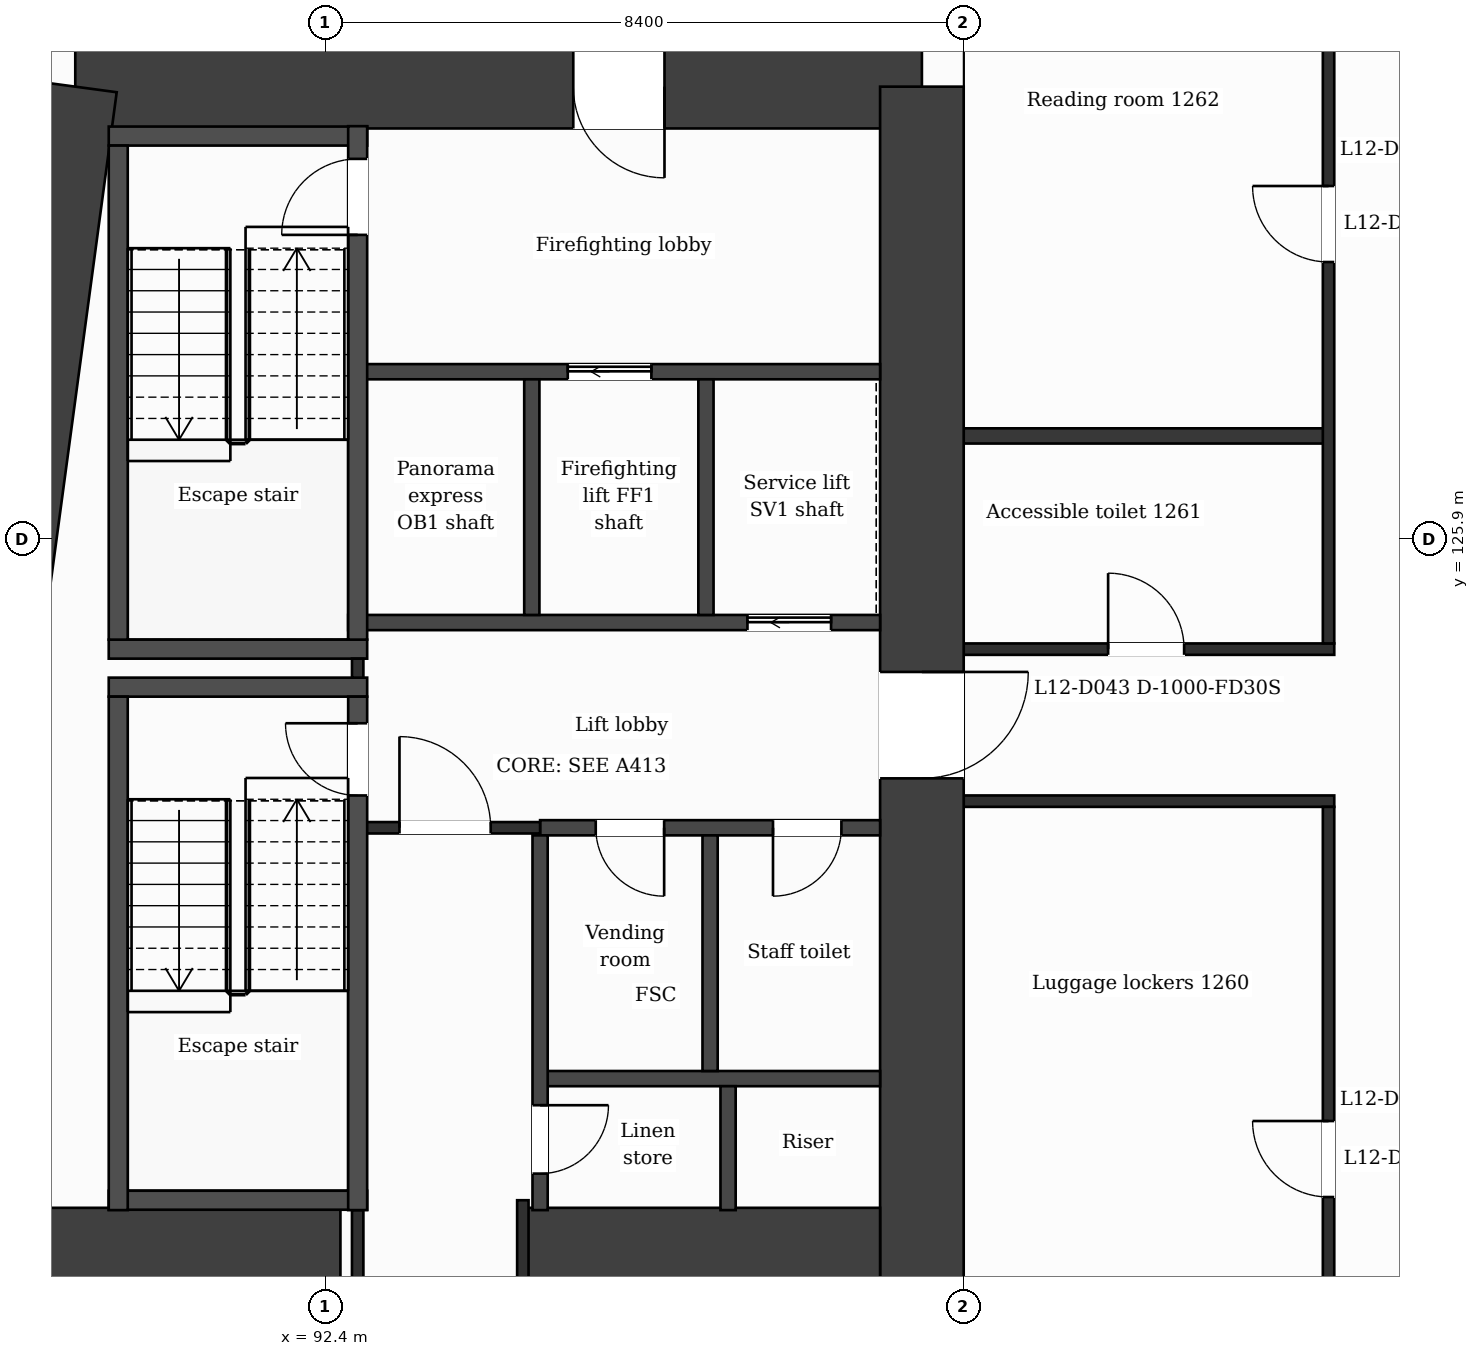
"""IFC4 building model, lengths in metres.
Left out: names, types, materials, properties, quantities, classifications, styles, units other than length and angle.
Written with IfcOpenShell. Run it as: python <this file> out.ifc"""

import sys

from ifc_helpers import new_model, si_unit, direction, frame, frame_2d, origin, place, context, subcontext, project, spatial, rectangle, extrude, element, fill, save


model = new_model("IFC4")
c1 = context("Model", 3, precision=1e-05, world=origin(), true_north=direction((0.0, 1.0)))
c2 = subcontext(c1, "Body", "Model", "MODEL_VIEW")
j1 = project(units=[si_unit("LENGTHUNIT", "METRE"), si_unit("PLANEANGLEUNIT", "RADIAN")], contexts=[c1])
p1 = place(None, origin())
s1 = spatial("IfcSite", under=j1, at=p1, CompositionType="ELEMENT")
p2 = place(p1, origin())
s2 = spatial("IfcBuilding", under=s1, at=p2, CompositionType="ELEMENT")
p3 = place(p2, frame((0.0, 0.0, 60.0)))
s3 = spatial("IfcBuildingStorey", under=s2, at=p3, CompositionType="ELEMENT", Elevation=60.0)
p4 = place(p3, frame((89.112, 131.85, 0.0), z_axis=(0.0, 0.0, 1.0), x_axis=(1.0, 0.0, 0.0)))
e1 = element("IfcWall", 1, at=p4, inside=s3, PredefinedType="SHEAR", context=c2, shape_type="SweptSolid", body=[
    extrude(rectangle(XDim=11.138, YDim=1.1, at=frame_2d((5.569, 0.0))), origin(), (0.0, 0.0, 1.0), 3.5),
])
p5 = place(p4, frame((6.552, 0.0, 0.0)))
e2 = element("IfcOpeningElement", 2, at=p5, cuts=e1, PredefinedType="OPENING", context=c2, shape_type="SweptSolid", body=[
    extrude(rectangle(XDim=1.2, YDim=2.1, at=frame_2d((0.6, 1.05))), frame((0.0, 0.56, 0.0), z_axis=(0.0, -1.0, 0.0), x_axis=(1.0, 0.0, 0.0)), (0.0, 0.0, 1.0), 1.12),
])
p6 = place(p3, frame((100.25, 131.85, 0.0), z_axis=(0.0, 0.0, 1.0), x_axis=(0.0, -1.0, 0.0)))
e3 = element("IfcWall", 3, at=p6, inside=s3, PredefinedType="SHEAR", context=c2, shape_type="SweptSolid", body=[
    extrude(rectangle(XDim=20.9, YDim=1.1, at=frame_2d((10.45, 0.0))), origin(), (0.0, 0.0, 1.0), 3.5),
])
p7 = place(p6, frame((7.7, 0.0, 0.0)))
e4 = element("IfcOpeningElement", 4, at=p7, cuts=e3, PredefinedType="OPENING", context=c2, shape_type="SweptSolid", body=[
    extrude(rectangle(XDim=1.4, YDim=2.1, at=frame_2d((0.7, 1.05))), frame((0.0, 0.56, 0.0), z_axis=(0.0, -1.0, 0.0), x_axis=(1.0, 0.0, 0.0)), (0.0, 0.0, 1.0), 1.12),
])
p8 = place(p3, frame((86.298, 110.95, 0.0), z_axis=(0.0, 0.0, 1.0), x_axis=(0.133400422634, 0.99106222168, 0.0)))
e5 = element("IfcWall", 5, at=p8, inside=s3, PredefinedType="SHEAR", context=c2, shape_type="SweptSolid", body=[
    extrude(rectangle(XDim=21.089, YDim=1.1, at=frame_2d((10.544, 0.0))), origin(), (0.0, 0.0, 1.0), 3.5),
])
p9 = place(p3, frame((87.523, 116.55, 0.0), z_axis=(0.0, 0.0, 1.0), x_axis=(1.0, 0.0, 0.0)))
e6 = element("IfcWall", 6, at=p9, inside=s3, PredefinedType="SHEAR", context=c2, shape_type="SweptSolid", body=[
    extrude(rectangle(XDim=5.077, YDim=1.1, at=frame_2d((2.539, 0.0))), origin(), (0.0, 0.0, 1.0), 3.5),
])
p10 = place(p3, frame((95.0, 116.55, 0.0), z_axis=(0.0, 0.0, 1.0), x_axis=(1.0, 0.0, 0.0)))
e7 = element("IfcWall", 7, at=p10, inside=s3, PredefinedType="SHEAR", context=c2, shape_type="SweptSolid", body=[
    extrude(rectangle(XDim=4.7, YDim=1.1, at=frame_2d((2.35, 0.0))), origin(), (0.0, 0.0, 1.0), 3.5),
])
p11 = place(p3, frame((89.552, 117.2, 0.0), z_axis=(0.0, 0.0, 1.0), x_axis=(1.0, 0.0, 0.0)))
e8 = element("IfcWall", 8, at=p11, inside=s3, PredefinedType="PARTITIONING", context=c2, shape_type="SweptSolid", body=[
    extrude(rectangle(XDim=3.4, YDim=0.25, at=frame_2d((1.7, 0.0))), origin(), (0.0, 0.0, 1.0), 3.18),
])
p12 = place(p3, frame((95.227, 118.8, 0.0), z_axis=(0.0, 0.0, 1.0), x_axis=(1.0, 0.0, 0.0)))
e9 = element("IfcWall", 9, at=p12, inside=s3, PredefinedType="PARTITIONING", context=c2, shape_type="SweptSolid", body=[
    extrude(rectangle(XDim=4.473, YDim=0.2, at=frame_2d((2.236, 0.0))), origin(), (0.0, 0.0, 1.0), 3.18),
])
p13 = place(p3, frame((95.227, 122.1, 0.0), z_axis=(0.0, 0.0, 1.0), x_axis=(1.0, 0.0, 0.0)))
e10 = element("IfcWall", 10, at=p13, inside=s3, PredefinedType="PARTITIONING", context=c2, shape_type="SweptSolid", body=[
    extrude(rectangle(XDim=4.473, YDim=0.2, at=frame_2d((2.236, 0.0))), origin(), (0.0, 0.0, 1.0), 3.18),
])
p14 = place(p13, frame((0.732, 0.0, 0.0)))
e11 = element("IfcOpeningElement", 11, at=p14, cuts=e10, PredefinedType="OPENING", context=c2, shape_type="SweptSolid", body=[
    extrude(rectangle(XDim=0.9, YDim=2.1, at=frame_2d((0.45, 1.05))), frame((0.0, 0.11, 0.0), z_axis=(0.0, -1.0, 0.0), x_axis=(1.0, 0.0, 0.0)), (0.0, 0.0, 1.0), 0.22),
])
p15 = place(p13, frame((3.064, 0.0, 0.0)))
e12 = element("IfcOpeningElement", 12, at=p15, cuts=e10, PredefinedType="OPENING", context=c2, shape_type="SweptSolid", body=[
    extrude(rectangle(XDim=0.9, YDim=2.1, at=frame_2d((0.45, 1.05))), frame((0.0, 0.11, 0.0), z_axis=(0.0, -1.0, 0.0), x_axis=(1.0, 0.0, 0.0)), (0.0, 0.0, 1.0), 0.22),
])
p16 = place(p3, frame((92.827, 122.1, 0.0), z_axis=(0.0, 0.0, 1.0), x_axis=(1.0, 0.0, 0.0)))
e13 = element("IfcWall", 13, at=p16, inside=s3, PredefinedType="PARTITIONING", context=c2, shape_type="SweptSolid", body=[
    extrude(rectangle(XDim=2.4, YDim=0.15, at=frame_2d((1.2, 0.0))), origin(), (0.0, 0.0, 1.0), 3.18),
])
p17 = place(p16, frame((0.55, 0.0, 0.0)))
e14 = element("IfcOpeningElement", 14, at=p17, cuts=e13, PredefinedType="OPENING", context=c2, shape_type="SweptSolid", body=[
    extrude(rectangle(XDim=1.2, YDim=2.1, at=frame_2d((0.6, 1.05))), frame((0.0, 0.085, 0.0), z_axis=(0.0, -1.0, 0.0), x_axis=(1.0, 0.0, 0.0)), (0.0, 0.0, 1.0), 0.17),
])
p18 = place(p3, frame((100.8, 122.45, 0.0), z_axis=(0.0, 0.0, 1.0), x_axis=(1.0, 0.0, 0.0)))
e15 = element("IfcWall", 15, at=p18, inside=s3, PredefinedType="PARTITIONING", context=c2, shape_type="SweptSolid", body=[
    extrude(rectangle(XDim=4.875, YDim=0.15, at=frame_2d((2.438, 0.0))), origin(), (0.0, 0.0, 1.0), 3.18),
])
for number, where, z_axis, x_axis in (
    (16, (89.552, 123.95, 0.0), (0.0, 0.0, 1.0), (1.0, 0.0, 0.0)),
    (17, (89.552, 124.45, 0.0), (0.0, 0.0, 1.0), (1.0, 0.0, 0.0)),
):
    element("IfcWall", number, at=place(p3, frame(where, z_axis=z_axis, x_axis=x_axis)), inside=s3, PredefinedType="PARTITIONING", context=c2, shape_type="SweptSolid", body=[
        extrude(rectangle(XDim=3.4, YDim=0.25, at=frame_2d((1.7, 0.0))), origin(), (0.0, 0.0, 1.0), 3.18),
    ])
p19 = place(p3, frame((100.8, 124.45, 0.0), z_axis=(0.0, 0.0, 1.0), x_axis=(1.0, 0.0, 0.0)))
e18 = element("IfcWall", 18, at=p19, inside=s3, PredefinedType="PARTITIONING", context=c2, shape_type="SweptSolid", body=[
    extrude(rectangle(XDim=4.875, YDim=0.15, at=frame_2d((2.438, 0.0))), origin(), (0.0, 0.0, 1.0), 3.18),
])
p20 = place(p19, frame((1.9, 0.0, 0.0)))
e19 = element("IfcOpeningElement", 19, at=p20, cuts=e18, PredefinedType="OPENING", context=c2, shape_type="SweptSolid", body=[
    extrude(rectangle(XDim=1.0, YDim=2.1, at=frame_2d((0.5, 1.05))), frame((0.0, 0.085, 0.0), z_axis=(0.0, -1.0, 0.0), x_axis=(1.0, 0.0, 0.0)), (0.0, 0.0, 1.0), 0.17),
])
p21 = place(p3, frame((92.702, 124.8, 0.0), z_axis=(0.0, 0.0, 1.0), x_axis=(1.0, 0.0, 0.0)))
e20 = element("IfcWall", 20, at=p21, inside=s3, PredefinedType="PARTITIONING", context=c2, shape_type="SweptSolid", body=[
    extrude(rectangle(XDim=6.998, YDim=0.2, at=frame_2d((3.499, 0.0))), origin(), (0.0, 0.0, 1.0), 3.18),
])
p22 = place(p21, frame((5.253, 0.0, 0.0)))
e21 = element("IfcOpeningElement", 21, at=p22, cuts=e20, PredefinedType="OPENING", context=c2, shape_type="SweptSolid", body=[
    extrude(rectangle(XDim=1.1, YDim=2.1, at=frame_2d((0.55, 1.05))), frame((0.0, 0.11, 0.0), z_axis=(0.0, -1.0, 0.0), x_axis=(1.0, 0.0, 0.0)), (0.0, 0.0, 1.0), 0.22),
])
p23 = place(p3, frame((100.8, 127.255, 0.0), z_axis=(0.0, 0.0, 1.0), x_axis=(1.0, 0.0, 0.0)))
e22 = element("IfcWall", 22, at=p23, inside=s3, PredefinedType="PARTITIONING", context=c2, shape_type="SweptSolid", body=[
    extrude(rectangle(XDim=4.8, YDim=0.2, at=frame_2d((2.4, 0.0))), origin(), (0.0, 0.0, 1.0), 3.18),
])
p24 = place(p3, frame((92.827, 128.1, 0.0), z_axis=(0.0, 0.0, 1.0), x_axis=(1.0, 0.0, 0.0)))
e23 = element("IfcWall", 23, at=p24, inside=s3, PredefinedType="PARTITIONING", context=c2, shape_type="SweptSolid", body=[
    extrude(rectangle(XDim=6.873, YDim=0.2, at=frame_2d((3.437, 0.0))), origin(), (0.0, 0.0, 1.0), 3.18),
])
p25 = place(p24, frame((2.764, 0.0, 0.0)))
e24 = element("IfcOpeningElement", 24, at=p25, cuts=e23, PredefinedType="OPENING", context=c2, shape_type="SweptSolid", body=[
    extrude(rectangle(XDim=1.1, YDim=2.1, at=frame_2d((0.55, 1.05))), frame((0.0, 0.11, 0.0), z_axis=(0.0, -1.0, 0.0), x_axis=(1.0, 0.0, 0.0)), (0.0, 0.0, 1.0), 0.22),
])
p26 = place(p3, frame((89.552, 131.2, 0.0), z_axis=(0.0, 0.0, 1.0), x_axis=(1.0, 0.0, 0.0)))
e25 = element("IfcWall", 25, at=p26, inside=s3, PredefinedType="PARTITIONING", context=c2, shape_type="SweptSolid", body=[
    extrude(rectangle(XDim=3.4, YDim=0.25, at=frame_2d((1.7, 0.0))), origin(), (0.0, 0.0, 1.0), 3.18),
])
p27 = place(p3, frame((89.677, 117.07, 0.0), z_axis=(0.0, 0.0, 1.0), x_axis=(0.0, 1.0, 0.0)))
e26 = element("IfcWall", 26, at=p27, inside=s3, PredefinedType="PARTITIONING", context=c2, shape_type="SweptSolid", body=[
    extrude(rectangle(XDim=6.755, YDim=0.25, at=frame_2d((3.377, 0.0))), origin(), (0.0, 0.0, 1.0), 3.18),
])
p28 = place(p3, frame((89.677, 124.575, 0.0), z_axis=(0.0, 0.0, 1.0), x_axis=(0.0, 1.0, 0.0)))
e27 = element("IfcWall", 27, at=p28, inside=s3, PredefinedType="PARTITIONING", context=c2, shape_type="SweptSolid", body=[
    extrude(rectangle(XDim=6.5, YDim=0.25, at=frame_2d((3.25, 0.0))), origin(), (0.0, 0.0, 1.0), 3.18),
])
p29 = place(p3, frame((92.827, 116.0, 0.0), z_axis=(0.0, 0.0, 1.0), x_axis=(0.0, 1.0, 0.0)))
e28 = element("IfcWall", 28, at=p29, inside=s3, PredefinedType="PARTITIONING", context=c2, shape_type="SweptSolid", body=[
    extrude(rectangle(XDim=1.07, YDim=0.15, at=frame_2d((0.535, 0.0))), origin(), (0.0, 0.0, 1.0), 3.18),
])
p30 = place(p3, frame((92.827, 124.075, 0.0), z_axis=(0.0, 0.0, 1.0), x_axis=(0.0, 1.0, 0.0)))
e29 = element("IfcWall", 29, at=p30, inside=s3, PredefinedType="PARTITIONING", context=c2, shape_type="SweptSolid", body=[
    extrude(rectangle(XDim=0.25, YDim=0.15, at=frame_2d((0.125, 0.0))), origin(), (0.0, 0.0, 1.0), 3.18),
])
p31 = place(p3, frame((92.827, 117.07, 0.0), z_axis=(0.0, 0.0, 1.0), x_axis=(0.0, 1.0, 0.0)))
e30 = element("IfcWall", 30, at=p31, inside=s3, PredefinedType="PARTITIONING", context=c2, shape_type="SweptSolid", body=[
    extrude(rectangle(XDim=6.755, YDim=0.25, at=frame_2d((3.377, 0.0))), origin(), (0.0, 0.0, 1.0), 3.18),
])
p32 = place(p31, frame((5.455, 0.0, 0.0)))
e31 = element("IfcOpeningElement", 31, at=p32, cuts=e30, PredefinedType="OPENING", context=c2, shape_type="SweptSolid", body=[
    extrude(rectangle(XDim=0.95, YDim=2.1, at=frame_2d((0.475, 1.05))), frame((0.0, 0.135, 0.0), z_axis=(0.0, -1.0, 0.0), x_axis=(1.0, 0.0, 0.0)), (0.0, 0.0, 1.0), 0.27),
])
p33 = place(p3, frame((92.827, 124.575, 0.0), z_axis=(0.0, 0.0, 1.0), x_axis=(0.0, 1.0, 0.0)))
e32 = element("IfcWall", 32, at=p33, inside=s3, PredefinedType="PARTITIONING", context=c2, shape_type="SweptSolid", body=[
    extrude(rectangle(XDim=6.755, YDim=0.25, at=frame_2d((3.377, 0.0))), origin(), (0.0, 0.0, 1.0), 3.18),
])
p34 = place(p33, frame((5.325, 0.0, 0.0)))
e33 = element("IfcOpeningElement", 33, at=p34, cuts=e32, PredefinedType="OPENING", context=c2, shape_type="SweptSolid", body=[
    extrude(rectangle(XDim=1.0, YDim=2.1, at=frame_2d((0.5, 1.05))), frame((0.0, 0.135, 0.0), z_axis=(0.0, -1.0, 0.0), x_axis=(1.0, 0.0, 0.0)), (0.0, 0.0, 1.0), 0.27),
])
p35 = place(p3, frame((95.0, 116.0, 0.0), z_axis=(0.0, 0.0, 1.0), x_axis=(0.0, 1.0, 0.0)))
e34 = element("IfcWall", 34, at=p35, inside=s3, PredefinedType="PARTITIONING", context=c2, shape_type="SweptSolid", body=[
    extrude(rectangle(XDim=1.2, YDim=0.15, at=frame_2d((0.6, 0.0))), origin(), (0.0, 0.0, 1.0), 3.18),
])
p36 = place(p3, frame((95.118, 124.9, 0.0), z_axis=(0.0, 0.0, 1.0), x_axis=(0.0, 1.0, 0.0)))
e35 = element("IfcWall", 35, at=p36, inside=s3, PredefinedType="PARTITIONING", context=c2, shape_type="SweptSolid", body=[
    extrude(rectangle(XDim=3.1, YDim=0.2, at=frame_2d((1.55, 0.0))), origin(), (0.0, 0.0, 1.0), 3.18),
])
p37 = place(p3, frame((95.227, 117.07, 0.0), z_axis=(0.0, 0.0, 1.0), x_axis=(0.0, 1.0, 0.0)))
e36 = element("IfcWall", 36, at=p37, inside=s3, PredefinedType="PARTITIONING", context=c2, shape_type="SweptSolid", body=[
    extrude(rectangle(XDim=4.93, YDim=0.2, at=frame_2d((2.465, 0.0))), origin(), (0.0, 0.0, 1.0), 3.18),
])
p38 = place(p37, frame((0.48, 0.0, 0.0)))
e37 = element("IfcOpeningElement", 37, at=p38, cuts=e36, PredefinedType="OPENING", context=c2, shape_type="SweptSolid", body=[
    extrude(rectangle(XDim=0.9, YDim=2.1, at=frame_2d((0.45, 1.05))), frame((0.0, 0.11, 0.0), z_axis=(0.0, -1.0, 0.0), x_axis=(1.0, 0.0, 0.0)), (0.0, 0.0, 1.0), 0.22),
])
for number, where, z_axis, x_axis in (
    (38, (97.409, 124.9, 0.0), (0.0, 0.0, 1.0), (0.0, 1.0, 0.0)),
    (39, (97.463, 118.9, 0.0), (0.0, 0.0, 1.0), (0.0, 1.0, 0.0)),
):
    element("IfcWall", number, at=place(p3, frame(where, z_axis=z_axis, x_axis=x_axis)), inside=s3, PredefinedType="PARTITIONING", context=c2, shape_type="SweptSolid", body=[
        extrude(rectangle(XDim=3.1, YDim=0.2, at=frame_2d((1.55, 0.0))), origin(), (0.0, 0.0, 1.0), 3.18),
    ])
p39 = place(p3, frame((97.7, 117.07, 0.0), z_axis=(0.0, 0.0, 1.0), x_axis=(0.0, 1.0, 0.0)))
e40 = element("IfcWall", 40, at=p39, inside=s3, PredefinedType="PARTITIONING", context=c2, shape_type="SweptSolid", body=[
    extrude(rectangle(XDim=1.63, YDim=0.2, at=frame_2d((0.815, 0.0))), origin(), (0.0, 0.0, 1.0), 3.18),
])
p40 = place(p3, frame((105.6, 109.075, 0.0), z_axis=(0.0, 0.0, 1.0), x_axis=(0.0, 1.0, 0.0)))
e41 = element("IfcWall", 41, at=p40, inside=s3, PredefinedType="PARTITIONING", context=c2, shape_type="SweptSolid", body=[
    extrude(rectangle(XDim=13.3, YDim=0.15, at=frame_2d((6.65, 0.0))), origin(), (0.0, 0.0, 1.0), 3.18),
])
p41 = place(p40, frame((8.167, 0.0, 0.0)))
e42 = element("IfcOpeningElement", 42, at=p41, cuts=e41, PredefinedType="OPENING", context=c2, shape_type="SweptSolid", body=[
    extrude(rectangle(XDim=1.0, YDim=2.1, at=frame_2d((0.5, 1.05))), frame((0.0, 0.085, 0.0), z_axis=(0.0, -1.0, 0.0), x_axis=(1.0, 0.0, 0.0)), (0.0, 0.0, 1.0), 0.17),
])
p42 = place(p3, frame((105.6, 124.525, 0.0), z_axis=(0.0, 0.0, 1.0), x_axis=(0.0, 1.0, 0.0)))
e43 = element("IfcWall", 43, at=p42, inside=s3, PredefinedType="PARTITIONING", context=c2, shape_type="SweptSolid", body=[
    extrude(rectangle(XDim=9.2, YDim=0.15, at=frame_2d((4.6, 0.0))), origin(), (0.0, 0.0, 1.0), 3.18),
])
p43 = place(p42, frame((5.018, 0.0, 0.0)))
e44 = element("IfcOpeningElement", 44, at=p43, cuts=e43, PredefinedType="OPENING", context=c2, shape_type="SweptSolid", body=[
    extrude(rectangle(XDim=1.0, YDim=2.1, at=frame_2d((0.5, 1.05))), frame((0.0, 0.085, 0.0), z_axis=(0.0, -1.0, 0.0), x_axis=(1.0, 0.0, 0.0)), (0.0, 0.0, 1.0), 0.17),
])
p44 = place(p17, origin())
e45 = element("IfcDoor", 45, at=p44, inside=s3, OperationType="SINGLE_SWING_LEFT", PredefinedType="DOOR", context=c2, shape_type="SweptSolid", body=[
    extrude(rectangle(XDim=1.2, YDim=2.1, at=frame_2d((0.6, 1.05))), frame((0.0, 0.025, 0.0), z_axis=(0.0, -1.0, 0.0), x_axis=(1.0, 0.0, 0.0)), (0.0, 0.0, 1.0), 0.05),
])
fill(e14, e45)
p45 = place(p25, origin())
e46 = element("IfcDoor", 46, at=p45, inside=s3, OperationType="SLIDING_TO_LEFT", PredefinedType="DOOR", context=c2, shape_type="SweptSolid", body=[
    extrude(rectangle(XDim=1.1, YDim=2.1, at=frame_2d((0.55, 1.05))), frame((0.0, 0.025, 0.0), z_axis=(0.0, -1.0, 0.0), x_axis=(1.0, 0.0, 0.0)), (0.0, 0.0, 1.0), 0.05),
])
fill(e24, e46)
p46 = place(p22, origin())
e47 = element("IfcDoor", 47, at=p46, inside=s3, OperationType="SLIDING_TO_LEFT", PredefinedType="DOOR", context=c2, shape_type="SweptSolid", body=[
    extrude(rectangle(XDim=1.1, YDim=2.1, at=frame_2d((0.55, 1.05))), frame((0.0, 0.025, 0.0), z_axis=(0.0, -1.0, 0.0), x_axis=(1.0, 0.0, 0.0)), (0.0, 0.0, 1.0), 0.05),
])
fill(e21, e47)
p47 = place(p14, origin())
e48 = element("IfcDoor", 48, at=p47, inside=s3, OperationType="SINGLE_SWING_RIGHT", PredefinedType="DOOR", context=c2, shape_type="SweptSolid", body=[
    extrude(rectangle(XDim=0.9, YDim=2.1, at=frame_2d((0.45, 1.05))), frame((0.0, 0.025, 0.0), z_axis=(0.0, -1.0, 0.0), x_axis=(1.0, 0.0, 0.0)), (0.0, 0.0, 1.0), 0.05),
])
fill(e11, e48)
p48 = place(p15, origin())
e49 = element("IfcDoor", 49, at=p48, inside=s3, OperationType="SINGLE_SWING_LEFT", PredefinedType="DOOR", context=c2, shape_type="SweptSolid", body=[
    extrude(rectangle(XDim=0.9, YDim=2.1, at=frame_2d((0.45, 1.05))), frame((0.0, 0.025, 0.0), z_axis=(0.0, -1.0, 0.0), x_axis=(1.0, 0.0, 0.0)), (0.0, 0.0, 1.0), 0.05),
])
fill(e12, e49)
p49 = place(p32, origin())
e50 = element("IfcDoor", 50, at=p49, inside=s3, OperationType="SINGLE_SWING_RIGHT", PredefinedType="DOOR", context=c2, shape_type="SweptSolid", body=[
    extrude(rectangle(XDim=0.95, YDim=2.1, at=frame_2d((0.475, 1.05))), frame((0.0, 0.025, 0.0), z_axis=(0.0, -1.0, 0.0), x_axis=(1.0, 0.0, 0.0)), (0.0, 0.0, 1.0), 0.05),
])
fill(e31, e50)
p50 = place(p34, origin())
e51 = element("IfcDoor", 51, at=p50, inside=s3, OperationType="SINGLE_SWING_LEFT", PredefinedType="DOOR", context=c2, shape_type="SweptSolid", body=[
    extrude(rectangle(XDim=1.0, YDim=2.1, at=frame_2d((0.5, 1.05))), frame((0.0, 0.025, 0.0), z_axis=(0.0, -1.0, 0.0), x_axis=(1.0, 0.0, 0.0)), (0.0, 0.0, 1.0), 0.05),
])
fill(e33, e51)
p51 = place(p38, origin())
e52 = element("IfcDoor", 52, at=p51, inside=s3, OperationType="SINGLE_SWING_RIGHT", PredefinedType="DOOR", context=c2, shape_type="SweptSolid", body=[
    extrude(rectangle(XDim=0.9, YDim=2.1, at=frame_2d((0.45, 1.05))), frame((0.0, 0.025, 0.0), z_axis=(0.0, -1.0, 0.0), x_axis=(1.0, 0.0, 0.0)), (0.0, 0.0, 1.0), 0.05),
])
fill(e37, e52)
p52 = place(p41, origin())
e53 = element("IfcDoor", 53, at=p52, inside=s3, OperationType="SINGLE_SWING_RIGHT", PredefinedType="DOOR", context=c2, shape_type="SweptSolid", body=[
    extrude(rectangle(XDim=1.0, YDim=2.1, at=frame_2d((0.5, 1.05))), frame((0.0, 0.025, 0.0), z_axis=(0.0, -1.0, 0.0), x_axis=(1.0, 0.0, 0.0)), (0.0, 0.0, 1.0), 0.05),
])
fill(e42, e53)
p53 = place(p20, origin())
e54 = element("IfcDoor", 54, at=p53, inside=s3, OperationType="SINGLE_SWING_LEFT", PredefinedType="DOOR", context=c2, shape_type="SweptSolid", body=[
    extrude(rectangle(XDim=1.0, YDim=2.1, at=frame_2d((0.5, 1.05))), frame((0.0, 0.025, 0.0), z_axis=(0.0, -1.0, 0.0), x_axis=(1.0, 0.0, 0.0)), (0.0, 0.0, 1.0), 0.05),
])
fill(e19, e54)
p54 = place(p43, origin())
e55 = element("IfcDoor", 55, at=p54, inside=s3, OperationType="SINGLE_SWING_RIGHT", PredefinedType="DOOR", context=c2, shape_type="SweptSolid", body=[
    extrude(rectangle(XDim=1.0, YDim=2.1, at=frame_2d((0.5, 1.05))), frame((0.0, 0.025, 0.0), z_axis=(0.0, -1.0, 0.0), x_axis=(1.0, 0.0, 0.0)), (0.0, 0.0, 1.0), 0.05),
])
fill(e44, e55)
p55 = place(p5, origin())
e56 = element("IfcDoor", 56, at=p55, inside=s3, OperationType="SINGLE_SWING_RIGHT", PredefinedType="DOOR", context=c2, shape_type="SweptSolid", body=[
    extrude(rectangle(XDim=1.2, YDim=2.1, at=frame_2d((0.6, 1.05))), frame((0.0, 0.025, 0.0), z_axis=(0.0, -1.0, 0.0), x_axis=(1.0, 0.0, 0.0)), (0.0, 0.0, 1.0), 0.05),
])
fill(e2, e56)
p56 = place(p7, origin())
e57 = element("IfcDoor", 57, at=p56, inside=s3, OperationType="SINGLE_SWING_LEFT", PredefinedType="DOOR", context=c2, shape_type="SweptSolid", body=[
    extrude(rectangle(XDim=1.4, YDim=2.1, at=frame_2d((0.7, 1.05))), frame((0.0, 0.025, 0.0), z_axis=(0.0, -1.0, 0.0), x_axis=(1.0, 0.0, 0.0)), (0.0, 0.0, 1.0), 0.05),
])
fill(e4, e57)
save(model, sys.argv[1])
